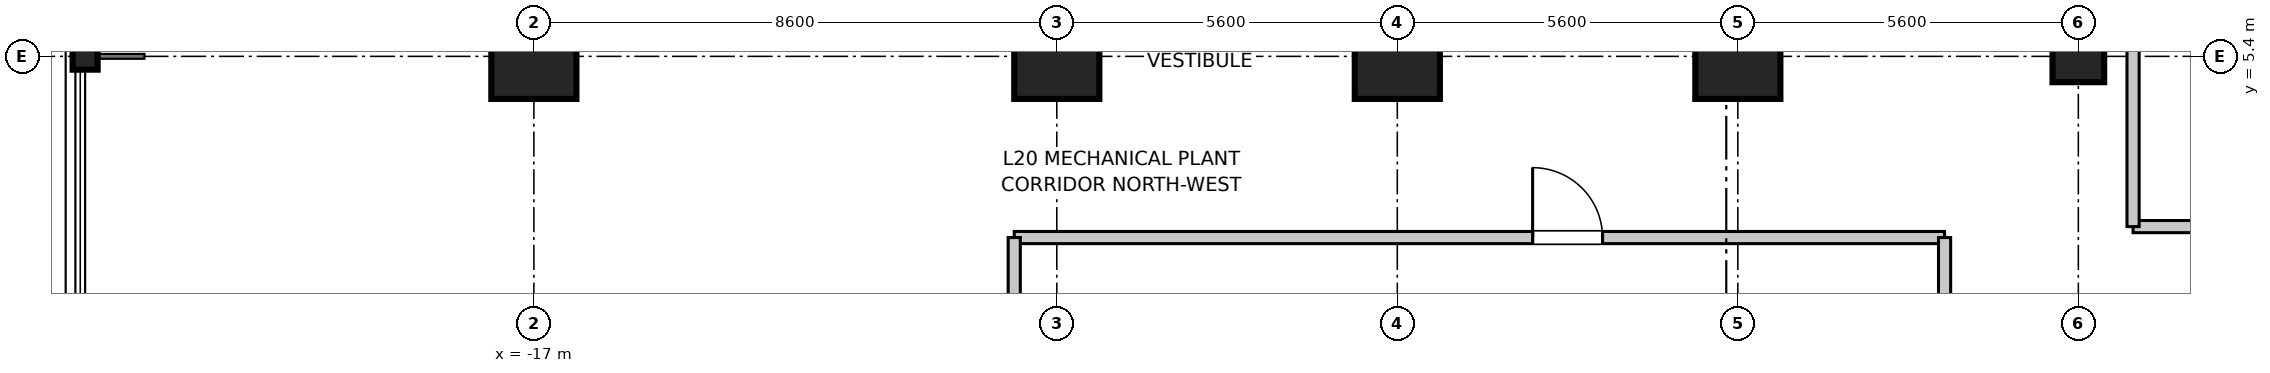
"""IFC4 building model, lengths in metres.
Left out: names, types, materials, properties, quantities, classifications, styles, units other than length and angle.
Written with IfcOpenShell. Run it as: python <this file> out.ifc"""

import sys

from ifc_helpers import new_model, si_unit, direction, frame, frame_2d, origin, origin_2d, place, context, subcontext, project, spatial, rectangle, i_section, extrude, source, transform, mapped, element, fill, save


model = new_model("IFC4")
c1 = context("Model", 3, precision=1e-05, world=origin(), true_north=direction((0.0, 1.0)))
c2 = subcontext(c1, "Body", "Model", "MODEL_VIEW")
j1 = project(units=[si_unit("LENGTHUNIT", "METRE"), si_unit("PLANEANGLEUNIT", "RADIAN")], contexts=[c1])
p1 = place(None, origin())
s1 = spatial("IfcSite", under=j1, at=p1, CompositionType="ELEMENT")
p2 = place(p1, origin())
s2 = spatial("IfcBuilding", under=s1, at=p2, CompositionType="ELEMENT")
p3 = place(p2, frame((0.0, 0.0, 83.5)))
s3 = spatial("IfcBuildingStorey", under=s2, at=p3, CompositionType="ELEMENT", Elevation=83.5)
m1 = source(origin(), c2, "Body", "SweptSolid", [
    extrude(rectangle(XDim=1.4, YDim=1.4, at=origin_2d()), origin(), (0.0, 0.0, 1.0), 4.755),
])
for number, where, z_axis, x_axis in (
    (1, (-17.0, 5.4, 0.0), (0.0, 0.0, 1.0), (1.0, 0.0, 0.0)),
    (2, (-8.4, 5.4, 0.0), (0.0, 0.0, 1.0), (1.0, 0.0, 0.0)),
    (3, (-2.8, 5.4, 0.0), (0.0, 0.0, 1.0), (1.0, 0.0, 0.0)),
    (4, (2.8, 5.4, 0.0), (0.0, 0.0, 1.0), (1.0, 0.0, 0.0)),
):
    element("IfcColumn", number, at=place(p3, frame(where, z_axis=z_axis, x_axis=x_axis)), inside=s3, PredefinedType="COLUMN", context=c2, shape_type="MappedRepresentation", body=[
        mapped(m1, transform((0.0, 0.0, 0.0), scale=1.0)),
    ])
m2 = source(origin(), c2, "Body", "SweptSolid", [
    extrude(rectangle(XDim=0.85, YDim=0.85, at=origin_2d()), origin(), (0.0, 0.0, 1.0), 4.755),
])
p4 = place(p3, frame((8.4, 5.4, 0.0), z_axis=(0.0, 0.0, 1.0), x_axis=(1.0, 0.0, 0.0)))
e5 = element("IfcColumn", 5, at=p4, inside=s3, PredefinedType="PILASTER", context=c2, shape_type="MappedRepresentation", body=[
    mapped(m2, transform((0.0, 0.0, 0.0), scale=1.0)),
])
m3 = source(origin(), c2, "Body", "SweptSolid", [
    extrude(i_section(OverallWidth=0.412, OverallDepth=0.438, WebThickness=0.023, FlangeThickness=0.036, at=origin_2d()), origin(), (0.0, 0.0, 1.0), 4.694),
])
p5 = place(p3, frame((-24.38, 5.4, 0.0), z_axis=(0.127804637987, 0.0, 0.991799362023), x_axis=(0.0, 1.0, 0.0)))
e6 = element("IfcColumn", 6, at=p5, inside=s3, PredefinedType="COLUMN", context=c2, shape_type="MappedRepresentation", body=[
    mapped(m3, transform((0.0, 0.0, 0.0), scale=1.0)),
])
m4 = source(origin(), c2, "Body", "SweptSolid", [
    extrude(rectangle(XDim=2.12, YDim=0.2, at=frame_2d((1.06, 0.0))), origin(), (0.0, 0.0, 1.0), 3.4),
])
p6 = place(p3, frame((9.3, 2.6, 0.0), z_axis=(0.0, 0.0, 1.0), x_axis=(1.0, 0.0, 0.0)))
e7 = element("IfcWall", 7, at=p6, inside=s3, PredefinedType="PARTITIONING", context=c2, shape_type="MappedRepresentation", body=[
    mapped(m4, transform((0.0, 0.0, 0.0), scale=1.0)),
])
m5 = source(origin(), c2, "Body", "SweptSolid", [
    extrude(rectangle(XDim=3.05, YDim=0.2, at=frame_2d((1.525, 0.0))), origin(), (0.0, 0.0, 1.0), 3.4),
])
p7 = place(p3, frame((9.3, 2.6, 0.0), z_axis=(0.0, 0.0, 1.0), x_axis=(0.0, 1.0, 0.0)))
e8 = element("IfcWall", 8, at=p7, inside=s3, PredefinedType="PARTITIONING", context=c2, shape_type="MappedRepresentation", body=[
    mapped(m5, transform((0.0, 0.0, 0.0), scale=1.0)),
])
m6 = source(origin(), c2, "Body", "SweptSolid", [
    extrude(rectangle(XDim=15.3, YDim=0.2, at=frame_2d((7.65, 0.0))), origin(), (0.0, 0.0, 1.0), 3.4),
])
p8 = place(p3, frame((-9.1, 2.42, 0.0), z_axis=(0.0, 0.0, 1.0), x_axis=(1.0, 0.0, 0.0)))
e9 = element("IfcWall", 9, at=p8, inside=s3, PredefinedType="PARTITIONING", context=c2, shape_type="MappedRepresentation", body=[
    mapped(m6, transform((0.0, 0.0, 0.0), scale=1.0)),
])
p9 = place(p8, frame((8.525, 0.0, 0.0)))
e10 = element("IfcOpeningElement", 10, at=p9, cuts=e9, PredefinedType="OPENING", context=c2, shape_type="SweptSolid", body=[
    extrude(rectangle(XDim=1.15, YDim=2.15, at=frame_2d((0.575, 1.075))), frame((0.0, 0.11, 0.0), z_axis=(0.0, -1.0, 0.0), x_axis=(1.0, 0.0, 0.0)), (0.0, 0.0, 1.0), 0.22),
])
m7 = source(origin(), c2, "Body", "SweptSolid", [
    extrude(rectangle(XDim=4.84, YDim=0.2, at=frame_2d((2.42, 0.0))), origin(), (0.0, 0.0, 1.0), 3.4),
])
for number, where, z_axis, x_axis in (
    (11, (-9.1, -2.42, 0.0), (0.0, 0.0, 1.0), (0.0, 1.0, 0.0)),
    (12, (6.2, -2.42, 0.0), (0.0, 0.0, 1.0), (0.0, 1.0, 0.0)),
):
    element("IfcWall", number, at=place(p3, frame(where, z_axis=z_axis, x_axis=x_axis)), inside=s3, PredefinedType="PARTITIONING", context=c2, shape_type="MappedRepresentation", body=[
        mapped(m7, transform((0.0, 0.0, 0.0), scale=1.0)),
    ])
m8 = source(origin(), c2, "Body", "SweptSolid", [
    extrude(rectangle(XDim=1.15, YDim=2.15, at=frame_2d((0.575, 1.075))), frame((0.0, 0.025, 0.0), z_axis=(0.0, -1.0, 0.0), x_axis=(1.0, 0.0, 0.0)), (0.0, 0.0, 1.0), 0.05),
])
p10 = place(p9, frame((1.15, 0.0, 0.0), z_axis=(0.0, 0.0, 1.0), x_axis=(-1.0, 0.0, 0.0)))
e13 = element("IfcDoor", 13, at=p10, inside=s3, OperationType="SINGLE_SWING_LEFT", PredefinedType="DOOR", context=c2, shape_type="MappedRepresentation", body=[
    mapped(m8, transform((0.0, 0.0, 0.0), scale=1.0)),
])
fill(e10, e13)
save(model, sys.argv[1])
